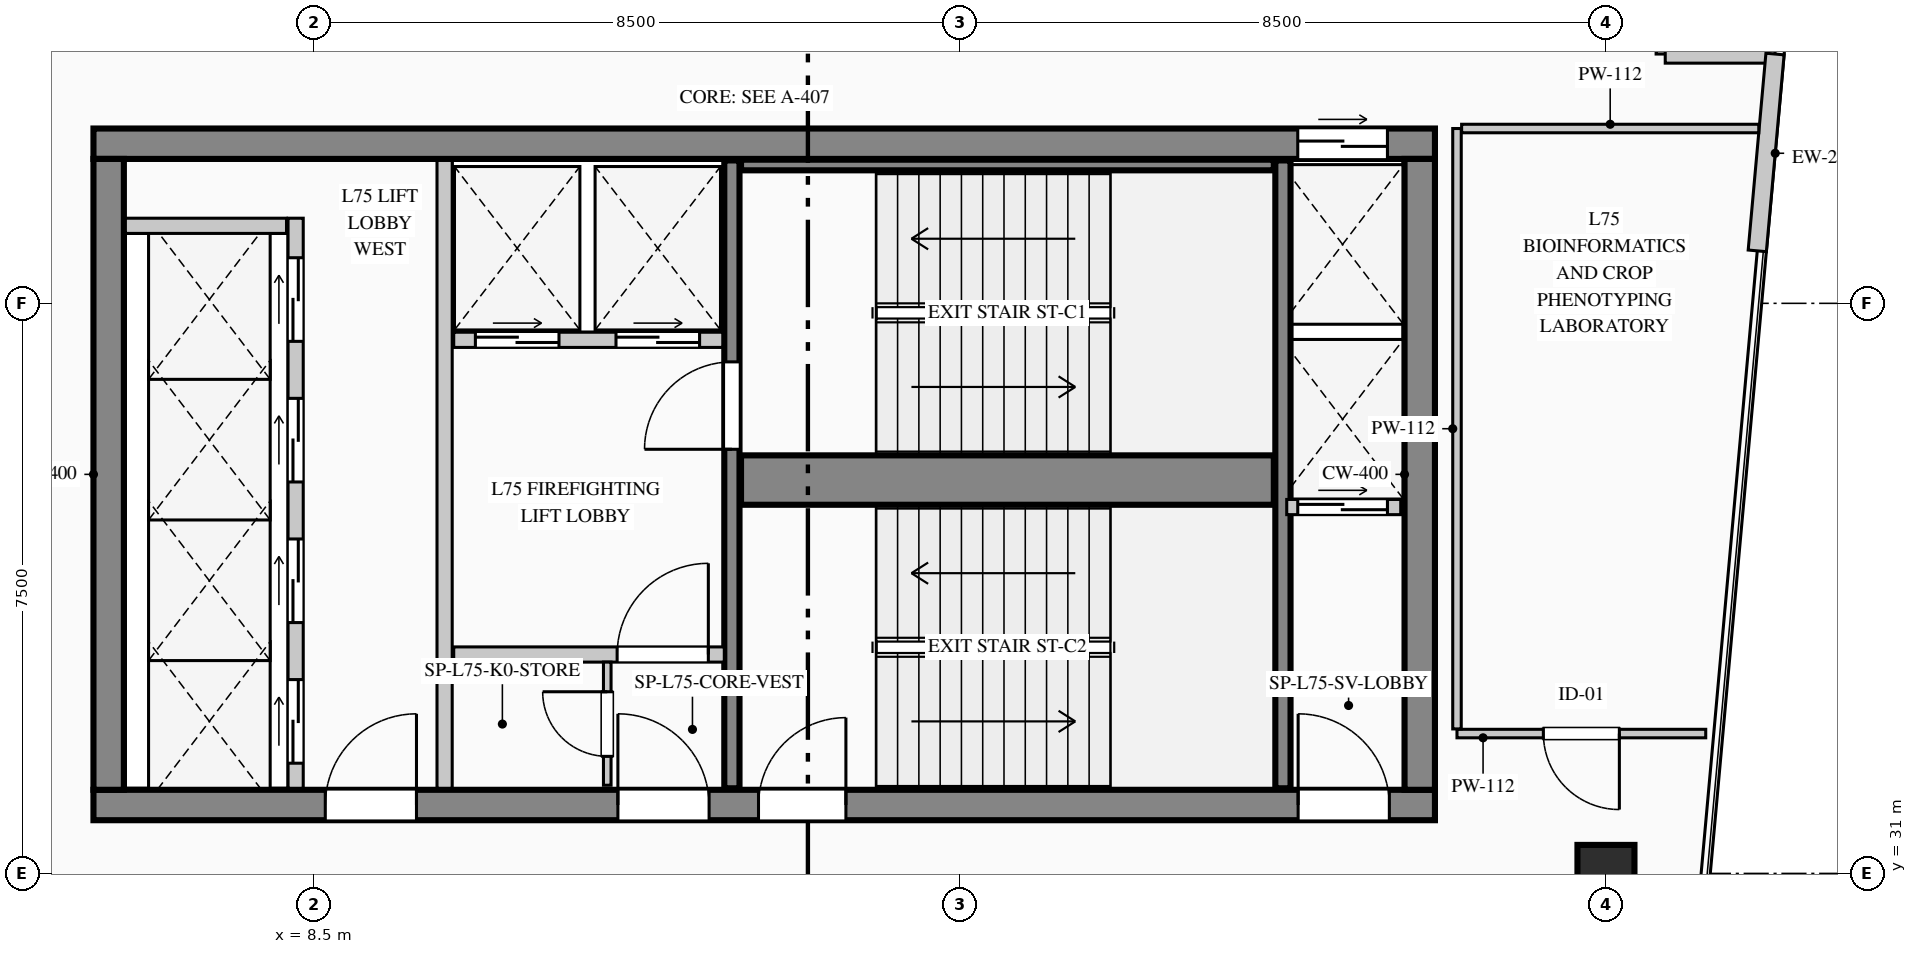
"""IFC4 building model, lengths in metres.
Left out: names, types, materials, properties, quantities, classifications, styles, units other than length and angle.
Written with IfcOpenShell. Run it as: python <this file> out.ifc"""

import sys

from ifc_helpers import new_model, si_unit, direction, frame, frame_2d, origin, origin_2d, place, context, subcontext, project, spatial, rectangle, extrude, element, fill, save


model = new_model("IFC4")
c1 = context("Model", 3, precision=1e-05, world=origin(), true_north=direction((0.0, 1.0)))
c2 = subcontext(c1, "Body", "Model", "MODEL_VIEW")
j1 = project(units=[si_unit("LENGTHUNIT", "METRE"), si_unit("PLANEANGLEUNIT", "RADIAN")], contexts=[c1])
p1 = place(None, origin())
s1 = spatial("IfcSite", under=j1, at=p1, CompositionType="ELEMENT")
p2 = place(p1, origin())
s2 = spatial("IfcBuilding", under=s1, at=p2, CompositionType="ELEMENT")
p3 = place(p2, frame((0.0, 0.0, 312.0)))
s3 = spatial("IfcBuildingStorey", under=s2, at=p3, CompositionType="ELEMENT", Elevation=312.0)
p4 = place(p3, frame((5.6, 40.6, 0.0), z_axis=(0.0, 0.0, 1.0), x_axis=(1.0, 0.0, 0.0)))
e1 = element("IfcWall", 1, at=p4, inside=s3, PredefinedType="SHEAR", context=c2, shape_type="SweptSolid", body=[
    extrude(rectangle(XDim=17.65, YDim=0.4, at=frame_2d((8.825, 0.0))), origin(), (0.0, 0.0, 1.0), 3.95),
])
p5 = place(p4, frame((15.845, 0.0, 0.0)))
e2 = element("IfcOpeningElement", 2, at=p5, cuts=e1, PredefinedType="OPENING", context=c2, shape_type="SweptSolid", body=[
    extrude(rectangle(XDim=1.18, YDim=2.25, at=frame_2d((0.59, 1.125))), frame((0.0, 0.21, 0.0), z_axis=(0.0, -1.0, 0.0), x_axis=(1.0, 0.0, 0.0)), (0.0, 0.0, 1.0), 0.42),
])
p6 = place(p3, frame((5.6, 31.9, 0.0), z_axis=(0.0, 0.0, 1.0), x_axis=(1.0, 0.0, 0.0)))
e3 = element("IfcWall", 3, at=p6, inside=s3, PredefinedType="SHEAR", context=c2, shape_type="SweptSolid", body=[
    extrude(rectangle(XDim=17.65, YDim=0.4, at=frame_2d((8.825, 0.0))), origin(), (0.0, 0.0, 1.0), 3.95),
])
p7 = place(p6, frame((3.05, 0.0, 0.0)))
e4 = element("IfcOpeningElement", 4, at=p7, cuts=e3, PredefinedType="OPENING", context=c2, shape_type="SweptSolid", body=[
    extrude(rectangle(XDim=1.2, YDim=2.2, at=frame_2d((0.6, 1.1))), frame((0.0, 0.21, 0.0), z_axis=(0.0, -1.0, 0.0), x_axis=(1.0, 0.0, 0.0)), (0.0, 0.0, 1.0), 0.42),
])
p8 = place(p6, frame((6.9, 0.0, 0.0)))
e5 = element("IfcOpeningElement", 5, at=p8, cuts=e3, PredefinedType="OPENING", context=c2, shape_type="SweptSolid", body=[
    extrude(rectangle(XDim=1.2, YDim=2.2, at=frame_2d((0.6, 1.1))), frame((0.0, 0.21, 0.0), z_axis=(0.0, -1.0, 0.0), x_axis=(1.0, 0.0, 0.0)), (0.0, 0.0, 1.0), 0.42),
])
p9 = place(p6, frame((8.75, 0.0, 0.0)))
e6 = element("IfcOpeningElement", 6, at=p9, cuts=e3, PredefinedType="OPENING", context=c2, shape_type="SweptSolid", body=[
    extrude(rectangle(XDim=1.15, YDim=2.2, at=frame_2d((0.575, 1.1))), frame((0.0, 0.21, 0.0), z_axis=(0.0, -1.0, 0.0), x_axis=(1.0, 0.0, 0.0)), (0.0, 0.0, 1.0), 0.42),
])
p10 = place(p6, frame((15.85, 0.0, 0.0)))
e7 = element("IfcOpeningElement", 7, at=p10, cuts=e3, PredefinedType="OPENING", context=c2, shape_type="SweptSolid", body=[
    extrude(rectangle(XDim=1.2, YDim=2.2, at=frame_2d((0.6, 1.1))), frame((0.0, 0.21, 0.0), z_axis=(0.0, -1.0, 0.0), x_axis=(1.0, 0.0, 0.0)), (0.0, 0.0, 1.0), 0.42),
])
for number, where, z_axis, x_axis in (
    (8, (5.8, 32.1, 0.0), (0.0, 0.0, 1.0), (0.0, 1.0, 0.0)),
    (9, (23.05, 32.1, 0.0), (0.0, 0.0, 1.0), (0.0, 1.0, 0.0)),
):
    element("IfcWall", number, at=place(p3, frame(where, z_axis=z_axis, x_axis=x_axis)), inside=s3, PredefinedType="SHEAR", context=c2, shape_type="SweptSolid", body=[
        extrude(rectangle(XDim=8.3, YDim=0.4, at=frame_2d((4.15, 0.0))), origin(), (0.0, 0.0, 1.0), 3.95),
    ])
p11 = place(p3, frame((14.0, 32.12, 0.0), z_axis=(0.0, 0.0, 1.0), x_axis=(0.0, 1.0, 0.0)))
e10 = element("IfcWall", 10, at=p11, inside=s3, PredefinedType="SHEAR", context=c2, shape_type="SweptSolid", body=[
    extrude(rectangle(XDim=8.26, YDim=0.2, at=frame_2d((4.13, 0.0))), origin(), (0.0, 0.0, 1.0), 3.95),
])
p12 = place(p11, frame((4.46, 0.0, 0.0)))
e11 = element("IfcOpeningElement", 11, at=p12, cuts=e10, PredefinedType="OPENING", context=c2, shape_type="SweptSolid", body=[
    extrude(rectangle(XDim=1.15, YDim=2.2, at=frame_2d((0.575, 1.1))), frame((0.0, 0.11, 0.0), z_axis=(0.0, -1.0, 0.0), x_axis=(1.0, 0.0, 0.0)), (0.0, 0.0, 1.0), 0.22),
])
p13 = place(p3, frame((14.12, 36.175, 0.0), z_axis=(0.0, 0.0, 1.0), x_axis=(1.0, 0.0, 0.0)))
e12 = element("IfcWall", 12, at=p13, inside=s3, PredefinedType="SHEAR", context=c2, shape_type="SweptSolid", body=[
    extrude(rectangle(XDim=7.01, YDim=0.65, at=frame_2d((3.505, 0.0))), origin(), (0.0, 0.0, 1.0), 3.95),
])
p14 = place(p3, frame((21.25, 32.12, 0.0), z_axis=(0.0, 0.0, 1.0), x_axis=(0.0, 1.0, 0.0)))
e13 = element("IfcWall", 13, at=p14, inside=s3, PredefinedType="SHEAR", context=c2, shape_type="SweptSolid", body=[
    extrude(rectangle(XDim=8.26, YDim=0.2, at=frame_2d((4.13, 0.0))), origin(), (0.0, 0.0, 1.0), 3.95),
])
p15 = place(p3, frame((14.12, 40.32, 0.0), z_axis=(0.0, 0.0, 1.0), x_axis=(1.0, 0.0, 0.0)))
e14 = element("IfcWall", 14, at=p15, inside=s3, PredefinedType="SHEAR", context=c2, shape_type="SweptSolid", body=[
    extrude(rectangle(XDim=7.01, YDim=0.14, at=frame_2d((3.505, 0.0))), origin(), (0.0, 0.0, 1.0), 3.95),
])
p16 = place(p3, frame((25.5, 31.0, 0.0), z_axis=(0.0, 0.0, 1.0), x_axis=(1.0, 0.0, 0.0)))
e15 = element("IfcColumn", 15, at=p16, inside=s3, PredefinedType="COLUMN", context=c2, shape_type="SweptSolid", body=[
    extrude(rectangle(XDim=0.75, YDim=0.75, at=origin_2d()), origin(), (0.0, 0.0, 1.0), 3.95),
])
p17 = place(p3, frame((26.28, 43.38, 0.0), z_axis=(0.0, 0.0, 1.0), x_axis=(0.0, -1.0, 0.0)))
e16 = element("IfcWall", 16, at=p17, inside=s3, PredefinedType="STANDARD", context=c2, shape_type="SweptSolid", body=[
    extrude(rectangle(XDim=1.6, YDim=0.24, at=frame_2d((0.8, 0.0))), origin(), (0.0, 0.0, 1.0), 3.7),
])
p18 = place(p3, frame((26.28, 41.78, 0.0), z_axis=(0.0, 0.0, 1.0), x_axis=(1.0, 0.0, 0.0)))
e17 = element("IfcWall", 17, at=p18, inside=s3, PredefinedType="STANDARD", context=c2, shape_type="SweptSolid", body=[
    extrude(rectangle(XDim=1.444, YDim=0.24, at=frame_2d((0.722, 0.0))), origin(), (0.0, 0.0, 1.0), 3.7),
])
p19 = place(p3, frame((27.724, 41.78, 0.0), z_axis=(0.0, 0.0, 1.0), x_axis=(-0.089765303723, -0.995962946222, 0.0)))
e18 = element("IfcWall", 18, at=p19, inside=s3, PredefinedType="STANDARD", context=c2, shape_type="SweptSolid", body=[
    extrude(rectangle(XDim=2.6, YDim=0.24, at=frame_2d((1.3, 0.0))), origin(), (0.0, 0.0, 1.0), 3.7),
])
p20 = place(p3, frame((8.26, 32.12, 0.0), z_axis=(0.0, 0.0, 1.0), x_axis=(0.0, 1.0, 0.0)))
e19 = element("IfcWall", 19, at=p20, inside=s3, PredefinedType="PARTITIONING", context=c2, shape_type="SweptSolid", body=[
    extrude(rectangle(XDim=7.5, YDim=0.2, at=frame_2d((3.75, 0.0))), origin(), (0.0, 0.0, 1.0), 3.7),
])
p21 = place(p20, frame((0.33, 0.0, 0.0)))
e20 = element("IfcOpeningElement", 20, at=p21, cuts=e19, PredefinedType="OPENING", context=c2, shape_type="SweptSolid", body=[
    extrude(rectangle(XDim=1.1, YDim=2.2, at=frame_2d((0.55, 1.1))), frame((0.0, 0.11, 0.0), z_axis=(0.0, -1.0, 0.0), x_axis=(1.0, 0.0, 0.0)), (0.0, 0.0, 1.0), 0.22),
])
p22 = place(p20, frame((2.18, 0.0, 0.0)))
e21 = element("IfcOpeningElement", 21, at=p22, cuts=e19, PredefinedType="OPENING", context=c2, shape_type="SweptSolid", body=[
    extrude(rectangle(XDim=1.1, YDim=2.2, at=frame_2d((0.55, 1.1))), frame((0.0, 0.11, 0.0), z_axis=(0.0, -1.0, 0.0), x_axis=(1.0, 0.0, 0.0)), (0.0, 0.0, 1.0), 0.22),
])
p23 = place(p20, frame((4.03, 0.0, 0.0)))
e22 = element("IfcOpeningElement", 22, at=p23, cuts=e19, PredefinedType="OPENING", context=c2, shape_type="SweptSolid", body=[
    extrude(rectangle(XDim=1.1, YDim=2.2, at=frame_2d((0.55, 1.1))), frame((0.0, 0.11, 0.0), z_axis=(0.0, -1.0, 0.0), x_axis=(1.0, 0.0, 0.0)), (0.0, 0.0, 1.0), 0.22),
])
p24 = place(p20, frame((5.88, 0.0, 0.0)))
e23 = element("IfcOpeningElement", 23, at=p24, cuts=e19, PredefinedType="OPENING", context=c2, shape_type="SweptSolid", body=[
    extrude(rectangle(XDim=1.1, YDim=2.2, at=frame_2d((0.55, 1.1))), frame((0.0, 0.11, 0.0), z_axis=(0.0, -1.0, 0.0), x_axis=(1.0, 0.0, 0.0)), (0.0, 0.0, 1.0), 0.22),
])
p25 = place(p3, frame((6.02, 39.52, 0.0), z_axis=(0.0, 0.0, 1.0), x_axis=(1.0, 0.0, 0.0)))
e24 = element("IfcWall", 24, at=p25, inside=s3, PredefinedType="PARTITIONING", context=c2, shape_type="SweptSolid", body=[
    extrude(rectangle(XDim=2.12, YDim=0.2, at=frame_2d((1.06, 0.0))), origin(), (0.0, 0.0, 1.0), 3.7),
])
p26 = place(p3, frame((10.22, 32.12, 0.0), z_axis=(0.0, 0.0, 1.0), x_axis=(0.0, 1.0, 0.0)))
e25 = element("IfcWall", 25, at=p26, inside=s3, PredefinedType="PARTITIONING", context=c2, shape_type="SweptSolid", body=[
    extrude(rectangle(XDim=8.26, YDim=0.2, at=frame_2d((4.13, 0.0))), origin(), (0.0, 0.0, 1.0), 3.7),
])
p27 = place(p3, frame((10.34, 38.02, 0.0), z_axis=(0.0, 0.0, 1.0), x_axis=(1.0, 0.0, 0.0)))
e26 = element("IfcWall", 26, at=p27, inside=s3, PredefinedType="PARTITIONING", context=c2, shape_type="SweptSolid", body=[
    extrude(rectangle(XDim=3.54, YDim=0.2, at=frame_2d((1.77, 0.0))), origin(), (0.0, 0.0, 1.0), 3.7),
])
p28 = place(p27, frame((0.285, 0.0, 0.0)))
e27 = element("IfcOpeningElement", 27, at=p28, cuts=e26, PredefinedType="OPENING", context=c2, shape_type="SweptSolid", body=[
    extrude(rectangle(XDim=1.1, YDim=2.2, at=frame_2d((0.55, 1.1))), frame((0.0, 0.11, 0.0), z_axis=(0.0, -1.0, 0.0), x_axis=(1.0, 0.0, 0.0)), (0.0, 0.0, 1.0), 0.22),
])
p29 = place(p27, frame((2.135, 0.0, 0.0)))
e28 = element("IfcOpeningElement", 28, at=p29, cuts=e26, PredefinedType="OPENING", context=c2, shape_type="SweptSolid", body=[
    extrude(rectangle(XDim=1.1, YDim=2.2, at=frame_2d((0.55, 1.1))), frame((0.0, 0.11, 0.0), z_axis=(0.0, -1.0, 0.0), x_axis=(1.0, 0.0, 0.0)), (0.0, 0.0, 1.0), 0.22),
])
p30 = place(p3, frame((10.34, 33.88, 0.0), z_axis=(0.0, 0.0, 1.0), x_axis=(1.0, 0.0, 0.0)))
e29 = element("IfcWall", 29, at=p30, inside=s3, PredefinedType="PARTITIONING", context=c2, shape_type="SweptSolid", body=[
    extrude(rectangle(XDim=3.56, YDim=0.2, at=frame_2d((1.78, 0.0))), origin(), (0.0, 0.0, 1.0), 3.7),
])
p31 = place(p30, frame((2.15, 0.0, 0.0)))
e30 = element("IfcOpeningElement", 30, at=p31, cuts=e29, PredefinedType="OPENING", context=c2, shape_type="SweptSolid", body=[
    extrude(rectangle(XDim=1.2, YDim=2.2, at=frame_2d((0.6, 1.1))), frame((0.0, 0.11, 0.0), z_axis=(0.0, -1.0, 0.0), x_axis=(1.0, 0.0, 0.0)), (0.0, 0.0, 1.0), 0.22),
])
p32 = place(p3, frame((12.36, 32.16, 0.0), z_axis=(0.0, 0.0, 1.0), x_axis=(0.0, 1.0, 0.0)))
e31 = element("IfcWall", 31, at=p32, inside=s3, PredefinedType="PARTITIONING", context=c2, shape_type="SweptSolid", body=[
    extrude(rectangle(XDim=1.62, YDim=0.1, at=frame_2d((0.81, 0.0))), origin(), (0.0, 0.0, 1.0), 3.7),
])
p33 = place(p32, frame((0.38, 0.0, 0.0)))
e32 = element("IfcOpeningElement", 32, at=p33, cuts=e31, PredefinedType="OPENING", context=c2, shape_type="SweptSolid", body=[
    extrude(rectangle(XDim=0.85, YDim=2.1, at=frame_2d((0.425, 1.05))), frame((0.0, 0.06, 0.0), z_axis=(0.0, -1.0, 0.0), x_axis=(1.0, 0.0, 0.0)), (0.0, 0.0, 1.0), 0.12),
])
p34 = place(p3, frame((21.3, 35.82, 0.0), z_axis=(0.0, 0.0, 1.0), x_axis=(1.0, 0.0, 0.0)))
e33 = element("IfcWall", 33, at=p34, inside=s3, PredefinedType="PARTITIONING", context=c2, shape_type="SweptSolid", body=[
    extrude(rectangle(XDim=1.5, YDim=0.2, at=frame_2d((0.75, 0.0))), origin(), (0.0, 0.0, 1.0), 3.7),
])
p35 = place(p34, frame((0.145, 0.0, 0.0)))
e34 = element("IfcOpeningElement", 34, at=p35, cuts=e33, PredefinedType="OPENING", context=c2, shape_type="SweptSolid", body=[
    extrude(rectangle(XDim=1.18, YDim=2.25, at=frame_2d((0.59, 1.125))), frame((0.0, 0.11, 0.0), z_axis=(0.0, -1.0, 0.0), x_axis=(1.0, 0.0, 0.0)), (0.0, 0.0, 1.0), 0.22),
])
p36 = place(p3, frame((26.813, 32.84, 0.0), z_axis=(0.0, 0.0, 1.0), x_axis=(-1.0, 0.0, 0.0)))
e35 = element("IfcWall", 35, at=p36, inside=s3, PredefinedType="PARTITIONING", context=c2, shape_type="SweptSolid", body=[
    extrude(rectangle(XDim=3.273, YDim=0.112, at=frame_2d((1.636, 0.0))), origin(), (0.0, 0.0, 1.0), 3.7),
])
p37 = place(p36, frame((1.136, 0.0, 0.0)))
e36 = element("IfcOpeningElement", 36, at=p37, cuts=e35, PredefinedType="OPENING", context=c2, shape_type="SweptSolid", body=[
    extrude(rectangle(XDim=1.0, YDim=2.15, at=frame_2d((0.5, 1.075))), frame((0.0, 0.066, 0.0), z_axis=(0.0, -1.0, 0.0), x_axis=(1.0, 0.0, 0.0)), (0.0, 0.0, 1.0), 0.132),
])
p38 = place(p3, frame((23.54, 32.901, 0.0), z_axis=(0.0, 0.0, 1.0), x_axis=(0.0, 1.0, 0.0)))
e37 = element("IfcWall", 37, at=p38, inside=s3, PredefinedType="PARTITIONING", context=c2, shape_type="SweptSolid", body=[
    extrude(rectangle(XDim=7.899, YDim=0.112, at=frame_2d((3.95, 0.0))), origin(), (0.0, 0.0, 1.0), 3.7),
])
p39 = place(p3, frame((23.601, 40.8, 0.0), z_axis=(0.0, 0.0, 1.0), x_axis=(1.0, 0.0, 0.0)))
e38 = element("IfcWall", 38, at=p39, inside=s3, PredefinedType="PARTITIONING", context=c2, shape_type="SweptSolid", body=[
    extrude(rectangle(XDim=3.909, YDim=0.112, at=frame_2d((1.955, 0.0))), origin(), (0.0, 0.0, 1.0), 3.7),
])
p40 = place(p7, origin())
e39 = element("IfcDoor", 39, at=p40, inside=s3, OperationType="SINGLE_SWING_RIGHT", PredefinedType="DOOR", context=c2, shape_type="SweptSolid", body=[
    extrude(rectangle(XDim=1.2, YDim=2.2, at=frame_2d((0.6, 1.1))), frame((0.0, 0.025, 0.0), z_axis=(0.0, -1.0, 0.0), x_axis=(1.0, 0.0, 0.0)), (0.0, 0.0, 1.0), 0.05),
])
fill(e4, e39)
p41 = place(p8, origin())
e40 = element("IfcDoor", 40, at=p41, inside=s3, OperationType="SINGLE_SWING_LEFT", PredefinedType="DOOR", context=c2, shape_type="SweptSolid", body=[
    extrude(rectangle(XDim=1.2, YDim=2.2, at=frame_2d((0.6, 1.1))), frame((0.0, 0.025, 0.0), z_axis=(0.0, -1.0, 0.0), x_axis=(1.0, 0.0, 0.0)), (0.0, 0.0, 1.0), 0.05),
])
fill(e5, e40)
p42 = place(p9, origin())
e41 = element("IfcDoor", 41, at=p42, inside=s3, OperationType="SINGLE_SWING_RIGHT", PredefinedType="DOOR", context=c2, shape_type="SweptSolid", body=[
    extrude(rectangle(XDim=1.15, YDim=2.2, at=frame_2d((0.575, 1.1))), frame((0.0, 0.025, 0.0), z_axis=(0.0, -1.0, 0.0), x_axis=(1.0, 0.0, 0.0)), (0.0, 0.0, 1.0), 0.05),
])
fill(e6, e41)
p43 = place(p10, origin())
e42 = element("IfcDoor", 42, at=p43, inside=s3, OperationType="SINGLE_SWING_LEFT", PredefinedType="DOOR", context=c2, shape_type="SweptSolid", body=[
    extrude(rectangle(XDim=1.2, YDim=2.2, at=frame_2d((0.6, 1.1))), frame((0.0, 0.025, 0.0), z_axis=(0.0, -1.0, 0.0), x_axis=(1.0, 0.0, 0.0)), (0.0, 0.0, 1.0), 0.05),
])
fill(e7, e42)
p44 = place(p31, origin())
e43 = element("IfcDoor", 43, at=p44, inside=s3, OperationType="SINGLE_SWING_RIGHT", PredefinedType="DOOR", context=c2, shape_type="SweptSolid", body=[
    extrude(rectangle(XDim=1.2, YDim=2.2, at=frame_2d((0.6, 1.1))), frame((0.0, 0.025, 0.0), z_axis=(0.0, -1.0, 0.0), x_axis=(1.0, 0.0, 0.0)), (0.0, 0.0, 1.0), 0.05),
])
fill(e30, e43)
p45 = place(p33, origin())
e44 = element("IfcDoor", 44, at=p45, inside=s3, OperationType="SINGLE_SWING_RIGHT", PredefinedType="DOOR", context=c2, shape_type="SweptSolid", body=[
    extrude(rectangle(XDim=0.85, YDim=2.1, at=frame_2d((0.425, 1.05))), frame((0.0, 0.025, 0.0), z_axis=(0.0, -1.0, 0.0), x_axis=(1.0, 0.0, 0.0)), (0.0, 0.0, 1.0), 0.05),
])
fill(e32, e44)
p46 = place(p12, origin())
e45 = element("IfcDoor", 45, at=p46, inside=s3, OperationType="SINGLE_SWING_LEFT", PredefinedType="DOOR", context=c2, shape_type="SweptSolid", body=[
    extrude(rectangle(XDim=1.15, YDim=2.2, at=frame_2d((0.575, 1.1))), frame((0.0, 0.025, 0.0), z_axis=(0.0, -1.0, 0.0), x_axis=(1.0, 0.0, 0.0)), (0.0, 0.0, 1.0), 0.05),
])
fill(e11, e45)
p47 = place(p21, origin())
e46 = element("IfcDoor", 46, at=p47, inside=s3, OperationType="DOUBLE_DOOR_SLIDING", PredefinedType="DOOR", context=c2, shape_type="SweptSolid", body=[
    extrude(rectangle(XDim=1.1, YDim=2.2, at=frame_2d((0.55, 1.1))), frame((0.0, 0.025, 0.0), z_axis=(0.0, -1.0, 0.0), x_axis=(1.0, 0.0, 0.0)), (0.0, 0.0, 1.0), 0.05),
])
fill(e20, e46)
p48 = place(p22, origin())
e47 = element("IfcDoor", 47, at=p48, inside=s3, OperationType="DOUBLE_DOOR_SLIDING", PredefinedType="DOOR", context=c2, shape_type="SweptSolid", body=[
    extrude(rectangle(XDim=1.1, YDim=2.2, at=frame_2d((0.55, 1.1))), frame((0.0, 0.025, 0.0), z_axis=(0.0, -1.0, 0.0), x_axis=(1.0, 0.0, 0.0)), (0.0, 0.0, 1.0), 0.05),
])
fill(e21, e47)
p49 = place(p23, origin())
e48 = element("IfcDoor", 48, at=p49, inside=s3, OperationType="DOUBLE_DOOR_SLIDING", PredefinedType="DOOR", context=c2, shape_type="SweptSolid", body=[
    extrude(rectangle(XDim=1.1, YDim=2.2, at=frame_2d((0.55, 1.1))), frame((0.0, 0.025, 0.0), z_axis=(0.0, -1.0, 0.0), x_axis=(1.0, 0.0, 0.0)), (0.0, 0.0, 1.0), 0.05),
])
fill(e22, e48)
p50 = place(p24, origin())
e49 = element("IfcDoor", 49, at=p50, inside=s3, OperationType="DOUBLE_DOOR_SLIDING", PredefinedType="DOOR", context=c2, shape_type="SweptSolid", body=[
    extrude(rectangle(XDim=1.1, YDim=2.2, at=frame_2d((0.55, 1.1))), frame((0.0, 0.025, 0.0), z_axis=(0.0, -1.0, 0.0), x_axis=(1.0, 0.0, 0.0)), (0.0, 0.0, 1.0), 0.05),
])
fill(e23, e49)
p51 = place(p28, origin())
e50 = element("IfcDoor", 50, at=p51, inside=s3, OperationType="DOUBLE_DOOR_SLIDING", PredefinedType="DOOR", context=c2, shape_type="SweptSolid", body=[
    extrude(rectangle(XDim=1.1, YDim=2.2, at=frame_2d((0.55, 1.1))), frame((0.0, 0.025, 0.0), z_axis=(0.0, -1.0, 0.0), x_axis=(1.0, 0.0, 0.0)), (0.0, 0.0, 1.0), 0.05),
])
fill(e27, e50)
p52 = place(p29, origin())
e51 = element("IfcDoor", 51, at=p52, inside=s3, OperationType="DOUBLE_DOOR_SLIDING", PredefinedType="DOOR", context=c2, shape_type="SweptSolid", body=[
    extrude(rectangle(XDim=1.1, YDim=2.2, at=frame_2d((0.55, 1.1))), frame((0.0, 0.025, 0.0), z_axis=(0.0, -1.0, 0.0), x_axis=(1.0, 0.0, 0.0)), (0.0, 0.0, 1.0), 0.05),
])
fill(e28, e51)
p53 = place(p5, origin())
e52 = element("IfcDoor", 52, at=p53, inside=s3, OperationType="DOUBLE_DOOR_SLIDING", PredefinedType="DOOR", context=c2, shape_type="SweptSolid", body=[
    extrude(rectangle(XDim=1.18, YDim=2.25, at=frame_2d((0.59, 1.125))), frame((0.0, 0.025, 0.0), z_axis=(0.0, -1.0, 0.0), x_axis=(1.0, 0.0, 0.0)), (0.0, 0.0, 1.0), 0.05),
])
fill(e2, e52)
p54 = place(p35, origin())
e53 = element("IfcDoor", 53, at=p54, inside=s3, OperationType="DOUBLE_DOOR_SLIDING", PredefinedType="DOOR", context=c2, shape_type="SweptSolid", body=[
    extrude(rectangle(XDim=1.18, YDim=2.25, at=frame_2d((0.59, 1.125))), frame((0.0, 0.025, 0.0), z_axis=(0.0, -1.0, 0.0), x_axis=(1.0, 0.0, 0.0)), (0.0, 0.0, 1.0), 0.05),
])
fill(e34, e53)
p55 = place(p37, origin())
e54 = element("IfcDoor", 54, at=p55, inside=s3, OperationType="SINGLE_SWING_LEFT", PredefinedType="DOOR", context=c2, shape_type="SweptSolid", body=[
    extrude(rectangle(XDim=1.0, YDim=2.15, at=frame_2d((0.5, 1.075))), frame((0.0, 0.025, 0.0), z_axis=(0.0, -1.0, 0.0), x_axis=(1.0, 0.0, 0.0)), (0.0, 0.0, 1.0), 0.05),
])
fill(e36, e54)
save(model, sys.argv[1])
